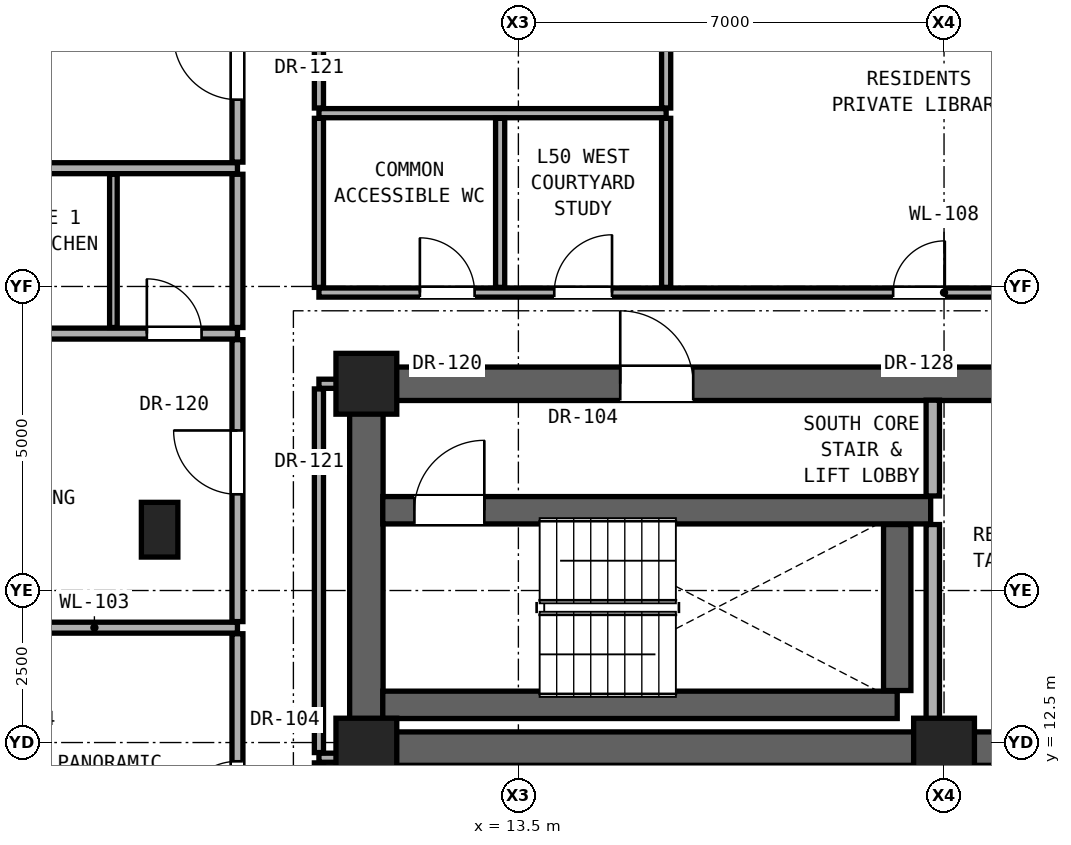
"""IFC4 building model, lengths in metres.
Left out: names, types, materials, properties, quantities, classifications, styles, units other than length and angle.
Written with IfcOpenShell. Run it as: python <this file> out.ifc"""

import sys

from ifc_helpers import new_model, si_unit, direction, frame, frame_2d, origin, origin_2d, place, context, subcontext, project, spatial, rectangle, extrude, element, fill, save


model = new_model("IFC4")
c1 = context("Model", 3, precision=1e-05, world=origin(), true_north=direction((0.0, 1.0)))
c2 = subcontext(c1, "Body", "Model", "MODEL_VIEW")
j1 = project(units=[si_unit("LENGTHUNIT", "METRE"), si_unit("PLANEANGLEUNIT", "RADIAN")], contexts=[c1])
p1 = place(None, origin())
s1 = spatial("IfcSite", under=j1, at=p1, CompositionType="ELEMENT")
p2 = place(p1, origin())
s2 = spatial("IfcBuilding", under=s1, at=p2, CompositionType="ELEMENT")
p3 = place(p2, frame((0.0, 0.0, 177.15)))
s3 = spatial("IfcBuildingStorey", under=s2, at=p3, CompositionType="ELEMENT", Elevation=177.15)
for number, where, z_axis, x_axis in (
    (1, (11.0, 12.4, 0.0), (0.0, 0.0, 1.0), (1.0, 0.0, 0.0)),
    (2, (20.5, 12.4, 0.0), (0.0, 0.0, 1.0), (1.0, 0.0, 0.0)),
    (3, (11.0, 18.4, 0.0), (0.0, 0.0, 1.0), (1.0, 0.0, 0.0)),
):
    element("IfcColumn", number, at=place(p3, frame(where, z_axis=z_axis, x_axis=x_axis)), inside=s3, PredefinedType="COLUMN", context=c2, shape_type="SweptSolid", body=[
        extrude(rectangle(XDim=1.0, YDim=1.0, at=origin_2d()), origin(), (0.0, 0.0, 1.0), 3.25),
    ])
p4 = place(p3, frame((7.6, 16.0, 0.0), z_axis=(0.0, 0.0, 1.0), x_axis=(1.0, 0.0, 0.0)))
e4 = element("IfcColumn", 4, at=p4, inside=s3, PredefinedType="PILASTER", context=c2, shape_type="SweptSolid", body=[
    extrude(rectangle(XDim=0.6, YDim=0.9, at=origin_2d()), origin(), (0.0, 0.0, 1.0), 3.25),
])
p5 = place(p3, frame((11.0, 12.4, 0.0), z_axis=(0.0, 0.0, 1.0), x_axis=(1.0, 0.0, 0.0)))
e5 = element("IfcWall", 5, at=p5, inside=s3, PredefinedType="SHEAR", context=c2, shape_type="SweptSolid", body=[
    extrude(rectangle(XDim=19.0, YDim=0.55, at=frame_2d((9.5, 0.0))), origin(), (0.0, 0.0, 1.0), 3.05),
])
p6 = place(p3, frame((11.0, 12.4, 0.0), z_axis=(0.0, 0.0, 1.0), x_axis=(0.0, 1.0, 0.0)))
e6 = element("IfcWall", 6, at=p6, inside=s3, PredefinedType="SHEAR", context=c2, shape_type="SweptSolid", body=[
    extrude(rectangle(XDim=6.0, YDim=0.55, at=frame_2d((3.0, 0.0))), origin(), (0.0, 0.0, 1.0), 3.05),
])
p7 = place(p3, frame((11.0, 18.4, 0.0), z_axis=(0.0, 0.0, 1.0), x_axis=(1.0, 0.0, 0.0)))
e7 = element("IfcWall", 7, at=p7, inside=s3, PredefinedType="SHEAR", context=c2, shape_type="SweptSolid", body=[
    extrude(rectangle(XDim=19.0, YDim=0.55, at=frame_2d((9.5, 0.0))), origin(), (0.0, 0.0, 1.0), 3.05),
])
p8 = place(p7, frame((4.175, 0.0, 0.0)))
e8 = element("IfcOpeningElement", 8, at=p8, cuts=e7, PredefinedType="OPENING", context=c2, shape_type="SweptSolid", body=[
    extrude(rectangle(XDim=1.2, YDim=2.25, at=frame_2d((0.6, 1.125))), frame((0.0, 0.285, 0.0), z_axis=(0.0, -1.0, 0.0), x_axis=(1.0, 0.0, 0.0)), (0.0, 0.0, 1.0), 0.57),
])
p9 = place(p7, frame((11.075, 0.0, 0.0)))
e9 = element("IfcOpeningElement", 9, at=p9, cuts=e7, PredefinedType="OPENING", context=c2, shape_type="SweptSolid", body=[
    extrude(rectangle(XDim=0.95, YDim=2.15, at=frame_2d((0.475, 1.075))), frame((0.0, 0.285, 0.0), z_axis=(0.0, -1.0, 0.0), x_axis=(1.0, 0.0, 0.0)), (0.0, 0.0, 1.0), 0.57),
])
p10 = place(p7, frame((14.3, 0.0, 0.0)))
e10 = element("IfcOpeningElement", 10, at=p10, cuts=e7, PredefinedType="OPENING", context=c2, shape_type="SweptSolid", body=[
    extrude(rectangle(XDim=1.3, YDim=2.3, at=frame_2d((0.65, 1.15))), frame((0.0, 0.285, 0.0), z_axis=(0.0, -1.0, 0.0), x_axis=(1.0, 0.0, 0.0)), (0.0, 0.0, 1.0), 0.57),
])
p11 = place(p7, frame((16.6, 0.0, 0.0)))
e11 = element("IfcOpeningElement", 11, at=p11, cuts=e7, PredefinedType="OPENING", context=c2, shape_type="SweptSolid", body=[
    extrude(rectangle(XDim=1.3, YDim=2.3, at=frame_2d((0.65, 1.15))), frame((0.0, 0.285, 0.0), z_axis=(0.0, -1.0, 0.0), x_axis=(1.0, 0.0, 0.0)), (0.0, 0.0, 1.0), 0.57),
])
p12 = place(p3, frame((10.22, 12.25, 0.0), z_axis=(0.0, 0.0, 1.0), x_axis=(1.0, 0.0, 0.0)))
e12 = element("IfcWall", 12, at=p12, inside=s3, PredefinedType="PARTITIONING", context=c2, shape_type="SweptSolid", body=[
    extrude(rectangle(XDim=0.51, YDim=0.15, at=frame_2d((0.255, 0.0))), origin(), (0.0, 0.0, 1.0), 3.05),
])
p13 = place(p3, frame((11.27, 13.12, 0.0), z_axis=(0.0, 0.0, 1.0), x_axis=(1.0, 0.0, 0.0)))
e13 = element("IfcWall", 13, at=p13, inside=s3, PredefinedType="SHEAR", context=c2, shape_type="SweptSolid", body=[
    extrude(rectangle(XDim=8.46, YDim=0.45, at=frame_2d((4.23, 0.0))), origin(), (0.0, 0.0, 1.0), 3.05),
])
p14 = place(p3, frame((4.175, 14.389, 0.0), z_axis=(0.0, 0.0, 1.0), x_axis=(1.0, 0.0, 0.0)))
e14 = element("IfcWall", 14, at=p14, inside=s3, PredefinedType="PARTITIONING", context=c2, shape_type="SweptSolid", body=[
    extrude(rectangle(XDim=4.705, YDim=0.18, at=frame_2d((2.353, 0.0))), origin(), (0.0, 0.0, 1.0), 3.05),
])
p15 = place(p3, frame((11.27, 16.32, 0.0), z_axis=(0.0, 0.0, 1.0), x_axis=(1.0, 0.0, 0.0)))
e15 = element("IfcWall", 15, at=p15, inside=s3, PredefinedType="SHEAR", context=c2, shape_type="SweptSolid", body=[
    extrude(rectangle(XDim=9.01, YDim=0.45, at=frame_2d((4.505, 0.0))), origin(), (0.0, 0.0, 1.0), 3.05),
])
p16 = place(p15, frame((0.52, 0.0, 0.0)))
e16 = element("IfcOpeningElement", 16, at=p16, cuts=e15, PredefinedType="OPENING", context=c2, shape_type="SweptSolid", body=[
    extrude(rectangle(XDim=1.15, YDim=2.2, at=frame_2d((0.575, 1.1))), frame((0.0, 0.235, 0.0), z_axis=(0.0, -1.0, 0.0), x_axis=(1.0, 0.0, 0.0)), (0.0, 0.0, 1.0), 0.47),
])
p17 = place(p3, frame((10.22, 18.4, 0.0), z_axis=(0.0, 0.0, 1.0), x_axis=(1.0, 0.0, 0.0)))
e17 = element("IfcWall", 17, at=p17, inside=s3, PredefinedType="PARTITIONING", context=c2, shape_type="SweptSolid", body=[
    extrude(rectangle(XDim=0.51, YDim=0.15, at=frame_2d((0.255, 0.0))), origin(), (0.0, 0.0, 1.0), 2.442),
])
p18 = place(p3, frame((-1.09, 19.225, 0.0), z_axis=(0.0, 0.0, 1.0), x_axis=(1.0, 0.0, 0.0)))
e18 = element("IfcWall", 18, at=p18, inside=s3, PredefinedType="PARTITIONING", context=c2, shape_type="SweptSolid", body=[
    extrude(rectangle(XDim=9.97, YDim=0.18, at=frame_2d((4.985, 0.0))), origin(), (0.0, 0.0, 1.0), 2.269),
])
p19 = place(p18, frame((1.624, 0.0, 0.0)))
e19 = element("IfcOpeningElement", 19, at=p19, cuts=e18, PredefinedType="OPENING", context=c2, shape_type="SweptSolid", body=[
    extrude(rectangle(XDim=0.95, YDim=2.15, at=frame_2d((0.475, 1.075))), frame((0.0, 0.1, 0.0), z_axis=(0.0, -1.0, 0.0), x_axis=(1.0, 0.0, 0.0)), (0.0, 0.0, 1.0), 0.2),
])
p20 = place(p18, frame((5.869, 0.0, 0.0)))
e20 = element("IfcOpeningElement", 20, at=p20, cuts=e18, PredefinedType="OPENING", context=c2, shape_type="SweptSolid", body=[
    extrude(rectangle(XDim=0.95, YDim=2.15, at=frame_2d((0.475, 1.075))), frame((0.0, 0.1, 0.0), z_axis=(0.0, -1.0, 0.0), x_axis=(1.0, 0.0, 0.0)), (0.0, 0.0, 1.0), 0.2),
])
p21 = place(p18, frame((8.48, 0.0, 0.0)))
e21 = element("IfcOpeningElement", 21, at=p21, cuts=e18, PredefinedType="OPENING", context=c2, shape_type="SweptSolid", body=[
    extrude(rectangle(XDim=0.9, YDim=2.1, at=frame_2d((0.45, 1.05))), frame((0.0, 0.1, 0.0), z_axis=(0.0, -1.0, 0.0), x_axis=(1.0, 0.0, 0.0)), (0.0, 0.0, 1.0), 0.2),
])
p22 = place(p3, frame((10.22, 19.9, 0.0), z_axis=(0.0, 0.0, 1.0), x_axis=(1.0, 0.0, 0.0)))
e22 = element("IfcWall", 22, at=p22, inside=s3, PredefinedType="PARTITIONING", context=c2, shape_type="SweptSolid", body=[
    extrude(rectangle(XDim=20.56, YDim=0.15, at=frame_2d((10.28, 0.0))), origin(), (0.0, 0.0, 1.0), 2.186),
])
p23 = place(p22, frame((1.66, 0.0, 0.0)))
e23 = element("IfcOpeningElement", 23, at=p23, cuts=e22, PredefinedType="OPENING", context=c2, shape_type="SweptSolid", body=[
    extrude(rectangle(XDim=0.9, YDim=2.1, at=frame_2d((0.45, 1.05))), frame((0.0, 0.085, 0.0), z_axis=(0.0, -1.0, 0.0), x_axis=(1.0, 0.0, 0.0)), (0.0, 0.0, 1.0), 0.17),
])
p24 = place(p22, frame((3.87, 0.0, 0.0)))
e24 = element("IfcOpeningElement", 24, at=p24, cuts=e22, PredefinedType="OPENING", context=c2, shape_type="SweptSolid", body=[
    extrude(rectangle(XDim=0.95, YDim=2.15, at=frame_2d((0.475, 1.075))), frame((0.0, 0.085, 0.0), z_axis=(0.0, -1.0, 0.0), x_axis=(1.0, 0.0, 0.0)), (0.0, 0.0, 1.0), 0.17),
])
p25 = place(p22, frame((9.443, 0.0, 0.0)))
e25 = element("IfcOpeningElement", 25, at=p25, cuts=e22, PredefinedType="OPENING", context=c2, shape_type="SweptSolid", body=[
    extrude(rectangle(XDim=0.85, YDim=2.01, at=frame_2d((0.425, 1.005))), frame((0.0, 0.085, 0.0), z_axis=(0.0, -1.0, 0.0), x_axis=(1.0, 0.0, 0.0)), (0.0, 0.0, 1.0), 0.17),
])
p26 = place(p22, frame((16.848, 0.0, 0.0)))
e26 = element("IfcOpeningElement", 26, at=p26, cuts=e22, PredefinedType="OPENING", context=c2, shape_type="SweptSolid", body=[
    extrude(rectangle(XDim=0.85, YDim=2.01, at=frame_2d((0.425, 1.005))), frame((0.0, 0.085, 0.0), z_axis=(0.0, -1.0, 0.0), x_axis=(1.0, 0.0, 0.0)), (0.0, 0.0, 1.0), 0.17),
])
p27 = place(p3, frame((-1.09, 21.945, 0.0), z_axis=(0.0, 0.0, 1.0), x_axis=(1.0, 0.0, 0.0)))
e27 = element("IfcWall", 27, at=p27, inside=s3, PredefinedType="PARTITIONING", context=c2, shape_type="SweptSolid", body=[
    extrude(rectangle(XDim=9.97, YDim=0.18, at=frame_2d((4.985, 0.0))), origin(), (0.0, 0.0, 1.0), 2.269),
])
p28 = place(p3, frame((10.22, 22.85, 0.0), z_axis=(0.0, 0.0, 1.0), x_axis=(1.0, 0.0, 0.0)))
e28 = element("IfcWall", 28, at=p28, inside=s3, PredefinedType="PARTITIONING", context=c2, shape_type="SweptSolid", body=[
    extrude(rectangle(XDim=5.71, YDim=0.15, at=frame_2d((2.855, 0.0))), origin(), (0.0, 0.0, 1.0), 2.186),
])
p29 = place(p3, frame((6.84, 19.325, 0.0), z_axis=(0.0, 0.0, 1.0), x_axis=(0.0, 1.0, 0.0)))
e29 = element("IfcWall", 29, at=p29, inside=s3, PredefinedType="PARTITIONING", context=c2, shape_type="SweptSolid", body=[
    extrude(rectangle(XDim=2.52, YDim=0.125, at=frame_2d((1.26, 0.0))), origin(), (0.0, 0.0, 1.0), 3.05),
])
p30 = place(p3, frame((8.88, 9.144, 0.0), z_axis=(0.0, 0.0, 1.0), x_axis=(0.0, 1.0, 0.0)))
e30 = element("IfcWall", 30, at=p30, inside=s3, PredefinedType="PARTITIONING", context=c2, shape_type="SweptSolid", body=[
    extrude(rectangle(XDim=5.145, YDim=0.18, at=frame_2d((2.573, 0.0))), origin(), (0.0, 0.0, 1.0), 3.05),
])
p31 = place(p30, frame((2.097, 0.0, 0.0)))
e31 = element("IfcOpeningElement", 31, at=p31, cuts=e30, PredefinedType="OPENING", context=c2, shape_type="SweptSolid", body=[
    extrude(rectangle(XDim=0.95, YDim=2.15, at=frame_2d((0.475, 1.075))), frame((0.0, 0.1, 0.0), z_axis=(0.0, -1.0, 0.0), x_axis=(1.0, 0.0, 0.0)), (0.0, 0.0, 1.0), 0.2),
])
p32 = place(p3, frame((8.88, 14.489, 0.0), z_axis=(0.0, 0.0, 1.0), x_axis=(0.0, 1.0, 0.0)))
e32 = element("IfcWall", 32, at=p32, inside=s3, PredefinedType="PARTITIONING", context=c2, shape_type="SweptSolid", body=[
    extrude(rectangle(XDim=4.636, YDim=0.18, at=frame_2d((2.318, 0.0))), origin(), (0.0, 0.0, 1.0), 2.442),
])
p33 = place(p32, frame((2.093, 0.0, 0.0)))
e33 = element("IfcOpeningElement", 33, at=p33, cuts=e32, PredefinedType="OPENING", context=c2, shape_type="SweptSolid", body=[
    extrude(rectangle(XDim=1.05, YDim=2.2, at=frame_2d((0.525, 1.1))), frame((0.0, 0.1, 0.0), z_axis=(0.0, -1.0, 0.0), x_axis=(1.0, 0.0, 0.0)), (0.0, 0.0, 1.0), 0.2),
])
p34 = place(p3, frame((8.88, 19.325, 0.0), z_axis=(0.0, 0.0, 1.0), x_axis=(0.0, 1.0, 0.0)))
e34 = element("IfcWall", 34, at=p34, inside=s3, PredefinedType="PARTITIONING", context=c2, shape_type="SweptSolid", body=[
    extrude(rectangle(XDim=2.52, YDim=0.18, at=frame_2d((1.26, 0.0))), origin(), (0.0, 0.0, 1.0), 3.05),
])
p35 = place(p3, frame((8.88, 22.045, 0.0), z_axis=(0.0, 0.0, 1.0), x_axis=(0.0, 1.0, 0.0)))
e35 = element("IfcWall", 35, at=p35, inside=s3, PredefinedType="PARTITIONING", context=c2, shape_type="SweptSolid", body=[
    extrude(rectangle(XDim=3.104, YDim=0.18, at=frame_2d((1.552, 0.0))), origin(), (0.0, 0.0, 1.0), 2.346),
])
p36 = place(p35, frame((1.027, 0.0, 0.0)))
e36 = element("IfcOpeningElement", 36, at=p36, cuts=e35, PredefinedType="OPENING", context=c2, shape_type="SweptSolid", body=[
    extrude(rectangle(XDim=1.05, YDim=2.2, at=frame_2d((0.525, 1.1))), frame((0.0, 0.1, 0.0), z_axis=(0.0, -1.0, 0.0), x_axis=(1.0, 0.0, 0.0)), (0.0, 0.0, 1.0), 0.2),
])
p37 = place(p3, frame((10.22, 9.144, 0.0), z_axis=(0.0, 0.0, 1.0), x_axis=(0.0, 1.0, 0.0)))
e37 = element("IfcWall", 37, at=p37, inside=s3, PredefinedType="PARTITIONING", context=c2, shape_type="SweptSolid", body=[
    extrude(rectangle(XDim=3.021, YDim=0.15, at=frame_2d((1.51, 0.0))), origin(), (0.0, 0.0, 1.0), 3.05),
])
p38 = place(p37, frame((0.986, 0.0, 0.0)))
e38 = element("IfcOpeningElement", 38, at=p38, cuts=e37, PredefinedType="OPENING", context=c2, shape_type="SweptSolid", body=[
    extrude(rectangle(XDim=1.05, YDim=2.2, at=frame_2d((0.525, 1.1))), frame((0.0, 0.085, 0.0), z_axis=(0.0, -1.0, 0.0), x_axis=(1.0, 0.0, 0.0)), (0.0, 0.0, 1.0), 0.17),
])
p39 = place(p3, frame((10.22, 12.335, 0.0), z_axis=(0.0, 0.0, 1.0), x_axis=(0.0, 1.0, 0.0)))
e39 = element("IfcWall", 39, at=p39, inside=s3, PredefinedType="PARTITIONING", context=c2, shape_type="SweptSolid", body=[
    extrude(rectangle(XDim=5.98, YDim=0.15, at=frame_2d((2.99, 0.0))), origin(), (0.0, 0.0, 1.0), 2.442),
])
p40 = place(p3, frame((10.22, 19.985, 0.0), z_axis=(0.0, 0.0, 1.0), x_axis=(0.0, 1.0, 0.0)))
e40 = element("IfcWall", 40, at=p40, inside=s3, PredefinedType="PARTITIONING", context=c2, shape_type="SweptSolid", body=[
    extrude(rectangle(XDim=2.78, YDim=0.15, at=frame_2d((1.39, 0.0))), origin(), (0.0, 0.0, 1.0), 3.05),
])
p41 = place(p3, frame((10.22, 22.935, 0.0), z_axis=(0.0, 0.0, 1.0), x_axis=(0.0, 1.0, 0.0)))
e41 = element("IfcWall", 41, at=p41, inside=s3, PredefinedType="PARTITIONING", context=c2, shape_type="SweptSolid", body=[
    extrude(rectangle(XDim=10.08, YDim=0.15, at=frame_2d((5.04, 0.0))), origin(), (0.0, 0.0, 1.0), 2.346),
])
p42 = place(p41, frame((4.565, 0.0, 0.0)))
e42 = element("IfcOpeningElement", 42, at=p42, cuts=e41, PredefinedType="OPENING", context=c2, shape_type="SweptSolid", body=[
    extrude(rectangle(XDim=0.95, YDim=2.15, at=frame_2d((0.475, 1.075))), frame((0.0, 0.085, 0.0), z_axis=(0.0, -1.0, 0.0), x_axis=(1.0, 0.0, 0.0)), (0.0, 0.0, 1.0), 0.17),
])
for number, where, z_axis, x_axis in (
    (43, (13.2, 19.985, 0.0), (0.0, 0.0, 1.0), (0.0, 1.0, 0.0)),
    (44, (15.93, 19.985, 0.0), (0.0, 0.0, 1.0), (0.0, 1.0, 0.0)),
):
    element("IfcWall", number, at=place(p3, frame(where, z_axis=z_axis, x_axis=x_axis)), inside=s3, PredefinedType="PARTITIONING", context=c2, shape_type="SweptSolid", body=[
        extrude(rectangle(XDim=2.78, YDim=0.15, at=frame_2d((1.39, 0.0))), origin(), (0.0, 0.0, 1.0), 3.05),
    ])
p43 = place(p3, frame((15.93, 22.935, 0.0), z_axis=(0.0, 0.0, 1.0), x_axis=(0.0, 1.0, 0.0)))
e45 = element("IfcWall", 45, at=p43, inside=s3, PredefinedType="PARTITIONING", context=c2, shape_type="SweptSolid", body=[
    extrude(rectangle(XDim=2.82, YDim=0.15, at=frame_2d((1.41, 0.0))), origin(), (0.0, 0.0, 1.0), 2.186),
])
p44 = place(p3, frame((19.73, 13.355, 0.0), z_axis=(0.0, 0.0, 1.0), x_axis=(0.0, 1.0, 0.0)))
e46 = element("IfcWall", 46, at=p44, inside=s3, PredefinedType="SHEAR", context=c2, shape_type="SweptSolid", body=[
    extrude(rectangle(XDim=2.73, YDim=0.45, at=frame_2d((1.365, 0.0))), origin(), (0.0, 0.0, 1.0), 3.05),
])
p45 = place(p3, frame((20.315, 12.8, 0.0), z_axis=(0.0, 0.0, 1.0), x_axis=(0.0, 1.0, 0.0)))
e47 = element("IfcWall", 47, at=p45, inside=s3, PredefinedType="SOLIDWALL", context=c2, shape_type="SweptSolid", body=[
    extrude(rectangle(XDim=3.285, YDim=0.22, at=frame_2d((1.643, 0.0))), origin(), (0.0, 0.0, 1.0), 3.05),
])
p46 = place(p3, frame((20.315, 16.555, 0.0), z_axis=(0.0, 0.0, 1.0), x_axis=(0.0, 1.0, 0.0)))
e48 = element("IfcWall", 48, at=p46, inside=s3, PredefinedType="SOLIDWALL", context=c2, shape_type="SweptSolid", body=[
    extrude(rectangle(XDim=1.575, YDim=0.22, at=frame_2d((0.788, 0.0))), origin(), (0.0, 0.0, 1.0), 3.05),
])
p47 = place(p8, origin())
e49 = element("IfcDoor", 49, at=p47, inside=s3, OperationType="SINGLE_SWING_LEFT", PredefinedType="DOOR", context=c2, shape_type="SweptSolid", body=[
    extrude(rectangle(XDim=1.2, YDim=2.25, at=frame_2d((0.6, 1.125))), frame((0.0, 0.025, 0.0), z_axis=(0.0, -1.0, 0.0), x_axis=(1.0, 0.0, 0.0)), (0.0, 0.0, 1.0), 0.05),
])
fill(e8, e49)
p48 = place(p16, origin())
e50 = element("IfcDoor", 50, at=p48, inside=s3, OperationType="SINGLE_SWING_RIGHT", PredefinedType="DOOR", context=c2, shape_type="SweptSolid", body=[
    extrude(rectangle(XDim=1.15, YDim=2.2, at=frame_2d((0.575, 1.1))), frame((0.0, 0.025, 0.0), z_axis=(0.0, -1.0, 0.0), x_axis=(1.0, 0.0, 0.0)), (0.0, 0.0, 1.0), 0.05),
])
fill(e16, e50)
p49 = place(p23, origin())
e51 = element("IfcDoor", 51, at=p49, inside=s3, OperationType="SINGLE_SWING_LEFT", PredefinedType="DOOR", context=c2, shape_type="SweptSolid", body=[
    extrude(rectangle(XDim=0.9, YDim=2.1, at=frame_2d((0.45, 1.05))), frame((0.0, 0.025, 0.0), z_axis=(0.0, -1.0, 0.0), x_axis=(1.0, 0.0, 0.0)), (0.0, 0.0, 1.0), 0.05),
])
fill(e23, e51)
p50 = place(p33, origin())
e52 = element("IfcDoor", 52, at=p50, inside=s3, OperationType="SINGLE_SWING_RIGHT", PredefinedType="DOOR", context=c2, shape_type="SweptSolid", body=[
    extrude(rectangle(XDim=1.05, YDim=2.2, at=frame_2d((0.525, 1.1))), frame((0.0, 0.025, 0.0), z_axis=(0.0, -1.0, 0.0), x_axis=(1.0, 0.0, 0.0)), (0.0, 0.0, 1.0), 0.05),
])
fill(e33, e52)
p51 = place(p21, origin())
e53 = element("IfcDoor", 53, at=p51, inside=s3, OperationType="SINGLE_SWING_LEFT", PredefinedType="DOOR", context=c2, shape_type="SweptSolid", body=[
    extrude(rectangle(XDim=0.9, YDim=2.1, at=frame_2d((0.45, 1.05))), frame((0.0, 0.025, 0.0), z_axis=(0.0, -1.0, 0.0), x_axis=(1.0, 0.0, 0.0)), (0.0, 0.0, 1.0), 0.05),
])
fill(e21, e53)
p52 = place(p36, origin())
e54 = element("IfcDoor", 54, at=p52, inside=s3, OperationType="SINGLE_SWING_RIGHT", PredefinedType="DOOR", context=c2, shape_type="SweptSolid", body=[
    extrude(rectangle(XDim=1.05, YDim=2.2, at=frame_2d((0.525, 1.1))), frame((0.0, 0.025, 0.0), z_axis=(0.0, -1.0, 0.0), x_axis=(1.0, 0.0, 0.0)), (0.0, 0.0, 1.0), 0.05),
])
fill(e36, e54)
p53 = place(p24, origin())
e55 = element("IfcDoor", 55, at=p53, inside=s3, OperationType="SINGLE_SWING_RIGHT", PredefinedType="DOOR", context=c2, shape_type="SweptSolid", body=[
    extrude(rectangle(XDim=0.95, YDim=2.15, at=frame_2d((0.475, 1.075))), frame((0.0, 0.025, 0.0), z_axis=(0.0, -1.0, 0.0), x_axis=(1.0, 0.0, 0.0)), (0.0, 0.0, 1.0), 0.05),
])
fill(e24, e55)
p54 = place(p25, origin())
e56 = element("IfcDoor", 56, at=p54, inside=s3, OperationType="SINGLE_SWING_RIGHT", PredefinedType="DOOR", context=c2, shape_type="SweptSolid", body=[
    extrude(rectangle(XDim=0.85, YDim=2.01, at=frame_2d((0.425, 1.005))), frame((0.0, 0.025, 0.0), z_axis=(0.0, -1.0, 0.0), x_axis=(1.0, 0.0, 0.0)), (0.0, 0.0, 1.0), 0.05),
])
fill(e25, e56)
p55 = place(p31, origin())
e57 = element("IfcDoor", 57, at=p55, inside=s3, OperationType="SINGLE_SWING_LEFT", PredefinedType="DOOR", context=c2, shape_type="SweptSolid", body=[
    extrude(rectangle(XDim=0.95, YDim=2.15, at=frame_2d((0.475, 1.075))), frame((0.0, 0.025, 0.0), z_axis=(0.0, -1.0, 0.0), x_axis=(1.0, 0.0, 0.0)), (0.0, 0.0, 1.0), 0.05),
])
fill(e31, e57)
save(model, sys.argv[1])
